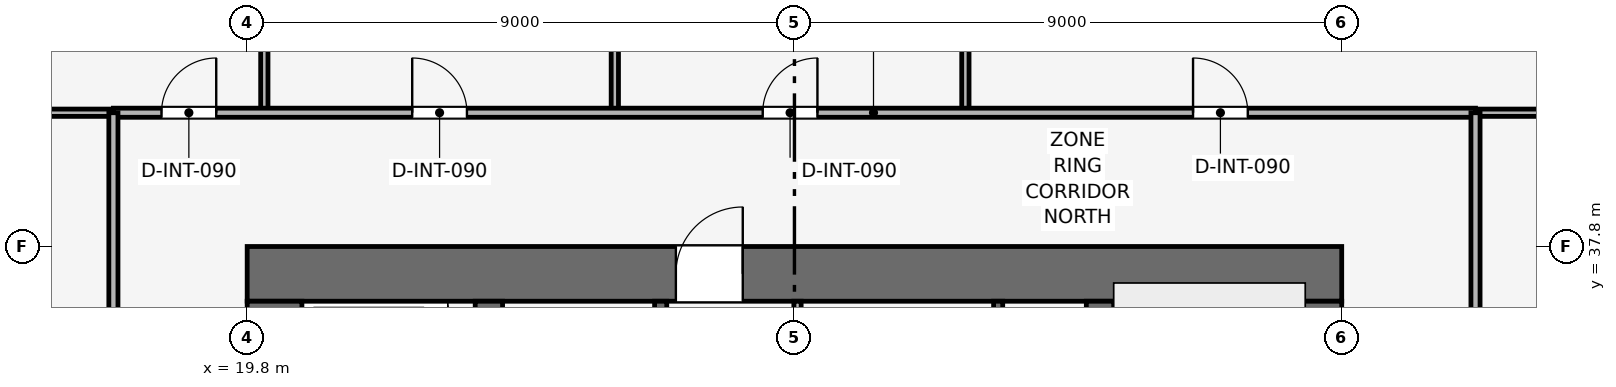
"""IFC4 building model, lengths in metres.
Left out: names, types, materials, properties, quantities, classifications, styles, units other than length and angle.
Written with IfcOpenShell. Run it as: python <this file> out.ifc"""

import sys

from ifc_helpers import new_model, si_unit, direction, frame, frame_2d, origin, place, context, subcontext, project, spatial, rectangle, extrude, element, fill, save


model = new_model("IFC4")
c1 = context("Model", 3, precision=1e-05, world=origin(), true_north=direction((0.0, 1.0)))
c2 = subcontext(c1, "Body", "Model", "MODEL_VIEW")
j1 = project(units=[si_unit("LENGTHUNIT", "METRE"), si_unit("PLANEANGLEUNIT", "RADIAN")], contexts=[c1])
p1 = place(None, origin())
s1 = spatial("IfcSite", under=j1, at=p1, CompositionType="ELEMENT")
p2 = place(p1, origin())
s2 = spatial("IfcBuilding", under=s1, at=p2, CompositionType="ELEMENT")
p3 = place(p2, frame((0.0, 0.0, 129.0)))
s3 = spatial("IfcBuildingStorey", under=s2, at=p3, CompositionType="ELEMENT", Elevation=129.0)
p4 = place(p3, frame((19.8, 37.35, 0.0), z_axis=(0.0, 0.0, 1.0), x_axis=(1.0, 0.0, 0.0)))
e1 = element("IfcWall", 1, at=p4, inside=s3, PredefinedType="SHEAR", context=c2, shape_type="SweptSolid", body=[
    extrude(rectangle(XDim=18.0, YDim=0.9, at=frame_2d((9.0, 0.0))), origin(), (0.0, 0.0, 1.0), 3.9),
])
p5 = place(p4, frame((7.05, 0.0, 0.0)))
e2 = element("IfcOpeningElement", 2, at=p5, cuts=e1, PredefinedType="OPENING", context=c2, shape_type="SweptSolid", body=[
    extrude(rectangle(XDim=1.1, YDim=2.15, at=frame_2d((0.55, 1.075))), frame((0.0, 0.46, 0.0), z_axis=(0.0, -1.0, 0.0), x_axis=(1.0, 0.0, 0.0)), (0.0, 0.0, 1.0), 0.92),
])
p6 = place(p3, frame((20.25, 20.7, 0.0), z_axis=(0.0, 0.0, 1.0), x_axis=(0.0, 1.0, 0.0)))
e3 = element("IfcWall", 3, at=p6, inside=s3, PredefinedType="SHEAR", context=c2, shape_type="SweptSolid", body=[
    extrude(rectangle(XDim=16.2, YDim=0.9, at=frame_2d((8.1, 0.0))), origin(), (0.0, 0.0, 1.0), 3.9),
])
p7 = place(p6, frame((10.1, 0.0, 0.0)))
e4 = element("IfcOpeningElement", 4, at=p7, cuts=e3, PredefinedType="OPENING", context=c2, shape_type="SweptSolid", body=[
    extrude(rectangle(XDim=1.1, YDim=2.15, at=frame_2d((0.55, 1.075))), frame((0.0, 0.46, 0.0), z_axis=(0.0, -1.0, 0.0), x_axis=(1.0, 0.0, 0.0)), (0.0, 0.0, 1.0), 0.92),
])
p8 = place(p3, frame((37.35, 20.7, 0.0), z_axis=(0.0, 0.0, 1.0), x_axis=(0.0, 1.0, 0.0)))
e5 = element("IfcWall", 5, at=p8, inside=s3, PredefinedType="SHEAR", context=c2, shape_type="SweptSolid", body=[
    extrude(rectangle(XDim=16.2, YDim=0.9, at=frame_2d((8.1, 0.0))), origin(), (0.0, 0.0, 1.0), 3.9),
])
p9 = place(p8, frame((4.6, 0.0, 0.0)))
e6 = element("IfcOpeningElement", 6, at=p9, cuts=e5, PredefinedType="OPENING", context=c2, shape_type="SweptSolid", body=[
    extrude(rectangle(XDim=1.1, YDim=2.15, at=frame_2d((0.55, 1.075))), frame((0.0, 0.46, 0.0), z_axis=(0.0, -1.0, 0.0), x_axis=(1.0, 0.0, 0.0)), (0.0, 0.0, 1.0), 0.92),
])
for number, where, z_axis, x_axis in (
    (7, (23.775, 20.7, 0.0), (0.0, 0.0, 1.0), (0.0, 1.0, 0.0)),
    (8, (33.825, 20.7, 0.0), (0.0, 0.0, 1.0), (0.0, 1.0, 0.0)),
):
    element("IfcWall", number, at=place(p3, frame(where, z_axis=z_axis, x_axis=x_axis)), inside=s3, PredefinedType="SHEAR", context=c2, shape_type="SweptSolid", body=[
        extrude(rectangle(XDim=16.2, YDim=0.45, at=frame_2d((8.1, 0.0))), origin(), (0.0, 0.0, 1.0), 3.9),
    ])
p10 = place(p3, frame((32.15, 34.0, 0.0), z_axis=(0.0, 0.0, 1.0), x_axis=(0.0, 1.0, 0.0)))
e9 = element("IfcWall", 9, at=p10, inside=s3, PredefinedType="SHEAR", context=c2, shape_type="SweptSolid", body=[
    extrude(rectangle(XDim=2.9, YDim=0.15, at=frame_2d((1.45, 0.0))), origin(), (0.0, 0.0, 1.0), 3.65),
])
p11 = place(p3, frame((26.6, 34.0, 0.0), z_axis=(0.0, 0.0, 1.0), x_axis=(0.0, 1.0, 0.0)))
e10 = element("IfcWall", 10, at=p11, inside=s3, PredefinedType="SHEAR", context=c2, shape_type="SweptSolid", body=[
    extrude(rectangle(XDim=2.9, YDim=0.2, at=frame_2d((1.45, 0.0))), origin(), (0.0, 0.0, 1.0), 3.65),
])
p12 = place(p11, frame((0.75, 0.0, 0.0)))
e11 = element("IfcOpeningElement", 11, at=p12, cuts=e10, PredefinedType="OPENING", context=c2, shape_type="SweptSolid", body=[
    extrude(rectangle(XDim=1.1, YDim=2.15, at=frame_2d((0.55, 1.075))), frame((0.0, 0.11, 0.0), z_axis=(0.0, -1.0, 0.0), x_axis=(1.0, 0.0, 0.0)), (0.0, 0.0, 1.0), 0.22),
])
p13 = place(p3, frame((28.85, 33.925, 0.0), z_axis=(0.0, 0.0, 1.0), x_axis=(0.0, 1.0, 0.0)))
e12 = element("IfcWall", 12, at=p13, inside=s3, PredefinedType="PARTITIONING", context=c2, shape_type="SweptSolid", body=[
    extrude(rectangle(XDim=2.975, YDim=0.12, at=frame_2d((1.487, 0.0))), origin(), (0.0, 0.0, 1.0), 3.65),
])
p14 = place(p13, frame((0.25, 0.0, 0.0)))
e13 = element("IfcOpeningElement", 13, at=p14, cuts=e12, PredefinedType="OPENING", context=c2, shape_type="SweptSolid", body=[
    extrude(rectangle(XDim=0.85, YDim=2.1, at=frame_2d((0.425, 1.05))), frame((0.0, 0.07, 0.0), z_axis=(0.0, -1.0, 0.0), x_axis=(1.0, 0.0, 0.0)), (0.0, 0.0, 1.0), 0.14),
])
p15 = place(p13, frame((1.645, 0.0, 0.0)))
e14 = element("IfcOpeningElement", 14, at=p15, cuts=e12, PredefinedType="OPENING", context=c2, shape_type="SweptSolid", body=[
    extrude(rectangle(XDim=0.85, YDim=2.1, at=frame_2d((0.425, 1.05))), frame((0.0, 0.07, 0.0), z_axis=(0.0, -1.0, 0.0), x_axis=(1.0, 0.0, 0.0)), (0.0, 0.0, 1.0), 0.14),
])
for number, where, z_axis, x_axis in (
    (15, (20.082, 40.0, 0.0), (0.0, 0.0, 1.0), (0.0, 1.0, 0.0)),
    (16, (25.846, 40.0, 0.0), (0.0, 0.0, 1.0), (0.0, 1.0, 0.0)),
    (17, (31.611, 40.0, 0.0), (0.0, 0.0, 1.0), (0.0, 1.0, 0.0)),
    (18, (2.83, 40.0, 0.0), (0.0, 0.0, 1.0), (1.0, 0.0, 0.0)),
    (19, (40.0, 40.0, 0.0), (0.0, 0.0, 1.0), (1.0, 0.0, 0.0)),
):
    element("IfcWall", number, at=place(p3, frame(where, z_axis=z_axis, x_axis=x_axis)), inside=s3, PredefinedType="PARTITIONING", context=c2, shape_type="SweptSolid", body=[
        extrude(rectangle(XDim=14.77, YDim=0.12, at=frame_2d((7.385, 0.0))), origin(), (0.0, 0.0, 1.0), 2.835),
    ])
p16 = place(p3, frame((17.6, 40.0, 0.0), z_axis=(0.0, 0.0, 1.0), x_axis=(1.0, 0.0, 0.0)))
e20 = element("IfcWall", 20, at=p16, inside=s3, PredefinedType="PARTITIONING", context=c2, shape_type="SweptSolid", body=[
    extrude(rectangle(XDim=22.4, YDim=0.15, at=frame_2d((11.2, 0.0))), origin(), (0.0, 0.0, 1.0), 3.185),
])
p17 = place(p16, frame((0.791, 0.0, 0.0)))
e21 = element("IfcOpeningElement", 21, at=p17, cuts=e20, PredefinedType="OPENING", context=c2, shape_type="SweptSolid", body=[
    extrude(rectangle(XDim=0.9, YDim=2.1, at=frame_2d((0.45, 1.05))), frame((0.0, 0.085, 0.0), z_axis=(0.0, -1.0, 0.0), x_axis=(1.0, 0.0, 0.0)), (0.0, 0.0, 1.0), 0.17),
])
p18 = place(p16, frame((4.914, 0.0, 0.0)))
e22 = element("IfcOpeningElement", 22, at=p18, cuts=e20, PredefinedType="OPENING", context=c2, shape_type="SweptSolid", body=[
    extrude(rectangle(XDim=0.9, YDim=2.1, at=frame_2d((0.45, 1.05))), frame((0.0, 0.085, 0.0), z_axis=(0.0, -1.0, 0.0), x_axis=(1.0, 0.0, 0.0)), (0.0, 0.0, 1.0), 0.17),
])
p19 = place(p16, frame((10.678, 0.0, 0.0)))
e23 = element("IfcOpeningElement", 23, at=p19, cuts=e20, PredefinedType="OPENING", context=c2, shape_type="SweptSolid", body=[
    extrude(rectangle(XDim=0.9, YDim=2.1, at=frame_2d((0.45, 1.05))), frame((0.0, 0.085, 0.0), z_axis=(0.0, -1.0, 0.0), x_axis=(1.0, 0.0, 0.0)), (0.0, 0.0, 1.0), 0.17),
])
p20 = place(p16, frame((17.755, 0.0, 0.0)))
e24 = element("IfcOpeningElement", 24, at=p20, cuts=e20, PredefinedType="OPENING", context=c2, shape_type="SweptSolid", body=[
    extrude(rectangle(XDim=0.9, YDim=2.1, at=frame_2d((0.45, 1.05))), frame((0.0, 0.085, 0.0), z_axis=(0.0, -1.0, 0.0), x_axis=(1.0, 0.0, 0.0)), (0.0, 0.0, 1.0), 0.17),
])
p21 = place(p3, frame((17.6, 17.6, 0.0), z_axis=(0.0, 0.0, 1.0), x_axis=(0.0, 1.0, 0.0)))
e25 = element("IfcWall", 25, at=p21, inside=s3, PredefinedType="PARTITIONING", context=c2, shape_type="SweptSolid", body=[
    extrude(rectangle(XDim=22.4, YDim=0.15, at=frame_2d((11.2, 0.0))), origin(), (0.0, 0.0, 1.0), 3.185),
])
p22 = place(p21, frame((10.75, 0.0, 0.0)))
e26 = element("IfcOpeningElement", 26, at=p22, cuts=e25, PredefinedType="OPENING", context=c2, shape_type="SweptSolid", body=[
    extrude(rectangle(XDim=0.9, YDim=2.1, at=frame_2d((0.45, 1.05))), frame((0.0, 0.085, 0.0), z_axis=(0.0, -1.0, 0.0), x_axis=(1.0, 0.0, 0.0)), (0.0, 0.0, 1.0), 0.17),
])
p23 = place(p3, frame((40.0, 17.6, 0.0), z_axis=(0.0, 0.0, 1.0), x_axis=(0.0, 1.0, 0.0)))
e27 = element("IfcWall", 27, at=p23, inside=s3, PredefinedType="PARTITIONING", context=c2, shape_type="SweptSolid", body=[
    extrude(rectangle(XDim=22.4, YDim=0.15, at=frame_2d((11.2, 0.0))), origin(), (0.0, 0.0, 1.0), 3.185),
])
p24 = place(p23, frame((1.95, 0.0, 0.0)))
e28 = element("IfcOpeningElement", 28, at=p24, cuts=e27, PredefinedType="OPENING", context=c2, shape_type="SweptSolid", body=[
    extrude(rectangle(XDim=0.9, YDim=2.1, at=frame_2d((0.45, 1.05))), frame((0.0, 0.085, 0.0), z_axis=(0.0, -1.0, 0.0), x_axis=(1.0, 0.0, 0.0)), (0.0, 0.0, 1.0), 0.17),
])
p25 = place(p23, frame((5.75, 0.0, 0.0)))
e29 = element("IfcOpeningElement", 29, at=p25, cuts=e27, PredefinedType="OPENING", context=c2, shape_type="SweptSolid", body=[
    extrude(rectangle(XDim=0.9, YDim=2.1, at=frame_2d((0.45, 1.05))), frame((0.0, 0.085, 0.0), z_axis=(0.0, -1.0, 0.0), x_axis=(1.0, 0.0, 0.0)), (0.0, 0.0, 1.0), 0.17),
])
p26 = place(p23, frame((8.65, 0.0, 0.0)))
e30 = element("IfcOpeningElement", 30, at=p26, cuts=e27, PredefinedType="OPENING", context=c2, shape_type="SweptSolid", body=[
    extrude(rectangle(XDim=0.9, YDim=2.1, at=frame_2d((0.45, 1.05))), frame((0.0, 0.085, 0.0), z_axis=(0.0, -1.0, 0.0), x_axis=(1.0, 0.0, 0.0)), (0.0, 0.0, 1.0), 0.17),
])
p27 = place(p23, frame((11.4, 0.0, 0.0)))
e31 = element("IfcOpeningElement", 31, at=p27, cuts=e27, PredefinedType="OPENING", context=c2, shape_type="SweptSolid", body=[
    extrude(rectangle(XDim=0.95, YDim=2.1, at=frame_2d((0.475, 1.05))), frame((0.0, 0.085, 0.0), z_axis=(0.0, -1.0, 0.0), x_axis=(1.0, 0.0, 0.0)), (0.0, 0.0, 1.0), 0.17),
])
p28 = place(p23, frame((17.35, 0.0, 0.0)))
e32 = element("IfcOpeningElement", 32, at=p28, cuts=e27, PredefinedType="OPENING", context=c2, shape_type="SweptSolid", body=[
    extrude(rectangle(XDim=0.9, YDim=2.1, at=frame_2d((0.45, 1.05))), frame((0.0, 0.085, 0.0), z_axis=(0.0, -1.0, 0.0), x_axis=(1.0, 0.0, 0.0)), (0.0, 0.0, 1.0), 0.17),
])
p29 = place(p17, origin())
e33 = element("IfcDoor", 33, at=p29, inside=s3, OperationType="SINGLE_SWING_RIGHT", PredefinedType="DOOR", context=c2, shape_type="SweptSolid", body=[
    extrude(rectangle(XDim=0.9, YDim=2.1, at=frame_2d((0.45, 1.05))), frame((0.0, 0.025, 0.0), z_axis=(0.0, -1.0, 0.0), x_axis=(1.0, 0.0, 0.0)), (0.0, 0.0, 1.0), 0.05),
])
fill(e21, e33)
p30 = place(p18, origin())
e34 = element("IfcDoor", 34, at=p30, inside=s3, OperationType="SINGLE_SWING_LEFT", PredefinedType="DOOR", context=c2, shape_type="SweptSolid", body=[
    extrude(rectangle(XDim=0.9, YDim=2.1, at=frame_2d((0.45, 1.05))), frame((0.0, 0.025, 0.0), z_axis=(0.0, -1.0, 0.0), x_axis=(1.0, 0.0, 0.0)), (0.0, 0.0, 1.0), 0.05),
])
fill(e22, e34)
p31 = place(p19, origin())
e35 = element("IfcDoor", 35, at=p31, inside=s3, OperationType="SINGLE_SWING_RIGHT", PredefinedType="DOOR", context=c2, shape_type="SweptSolid", body=[
    extrude(rectangle(XDim=0.9, YDim=2.1, at=frame_2d((0.45, 1.05))), frame((0.0, 0.025, 0.0), z_axis=(0.0, -1.0, 0.0), x_axis=(1.0, 0.0, 0.0)), (0.0, 0.0, 1.0), 0.05),
])
fill(e23, e35)
p32 = place(p20, origin())
e36 = element("IfcDoor", 36, at=p32, inside=s3, OperationType="SINGLE_SWING_LEFT", PredefinedType="DOOR", context=c2, shape_type="SweptSolid", body=[
    extrude(rectangle(XDim=0.9, YDim=2.1, at=frame_2d((0.45, 1.05))), frame((0.0, 0.025, 0.0), z_axis=(0.0, -1.0, 0.0), x_axis=(1.0, 0.0, 0.0)), (0.0, 0.0, 1.0), 0.05),
])
fill(e24, e36)
p33 = place(p5, origin())
e37 = element("IfcDoor", 37, at=p33, inside=s3, OperationType="SINGLE_SWING_RIGHT", PredefinedType="DOOR", context=c2, shape_type="SweptSolid", body=[
    extrude(rectangle(XDim=1.1, YDim=2.15, at=frame_2d((0.55, 1.075))), frame((0.0, 0.025, 0.0), z_axis=(0.0, -1.0, 0.0), x_axis=(1.0, 0.0, 0.0)), (0.0, 0.0, 1.0), 0.05),
])
fill(e2, e37)
save(model, sys.argv[1])
